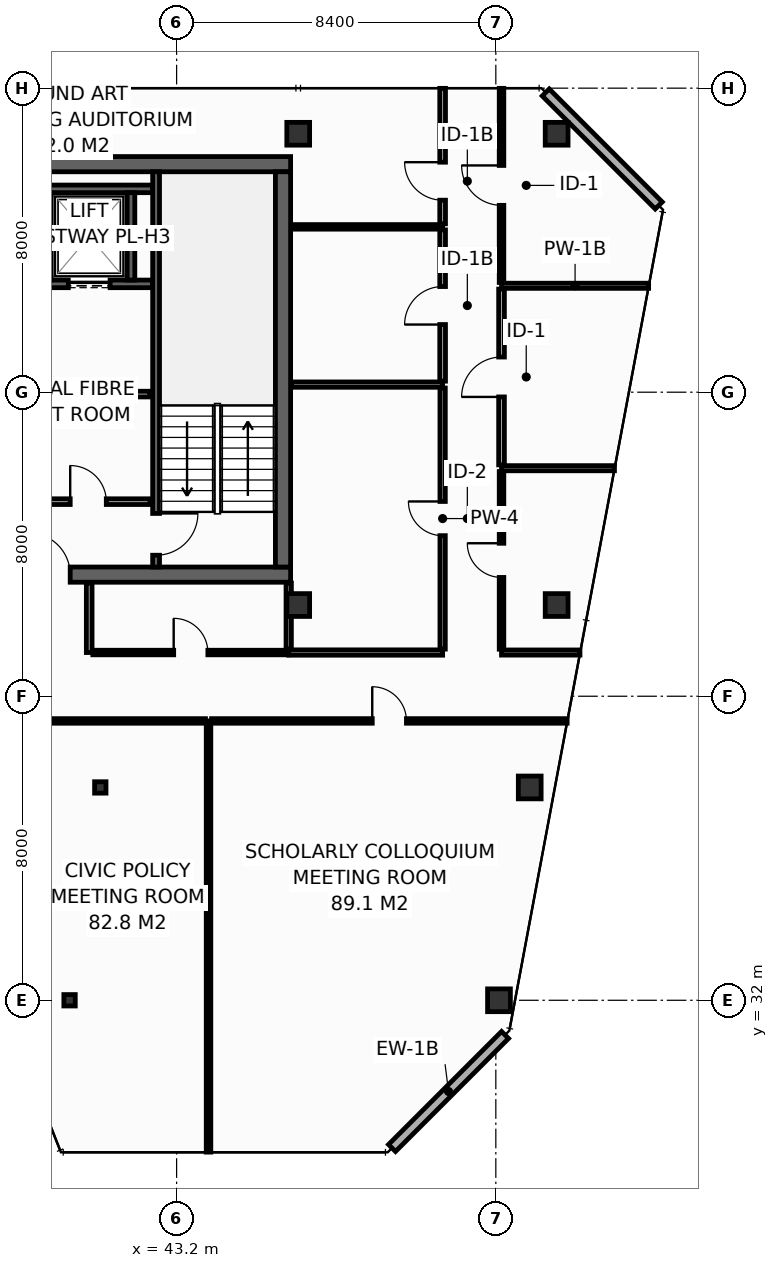
"""IFC4 building model, lengths in metres.
Left out: names, types, materials, properties, quantities, classifications, styles, units other than length and angle.
Written with IfcOpenShell. Run it as: python <this file> out.ifc"""

import sys

from ifc_helpers import new_model, si_unit, direction, frame, frame_2d, origin, origin_2d, place, context, subcontext, project, spatial, rectangle, hollow_rectangle, extrude, element, fill, save


model = new_model("IFC4")
c1 = context("Model", 3, precision=1e-05, world=origin(), true_north=direction((0.0, 1.0)))
c2 = subcontext(c1, "Body", "Model", "MODEL_VIEW")
j1 = project(units=[si_unit("LENGTHUNIT", "METRE"), si_unit("PLANEANGLEUNIT", "RADIAN")], contexts=[c1])
p1 = place(None, origin())
s1 = spatial("IfcSite", under=j1, at=p1, CompositionType="ELEMENT")
p2 = place(p1, origin())
s2 = spatial("IfcBuilding", under=s1, at=p2, CompositionType="ELEMENT")
p3 = place(p2, frame((0.0, 0.0, 287.6)))
s3 = spatial("IfcBuildingStorey", under=s2, at=p3, CompositionType="ELEMENT", Elevation=287.6)
p4 = place(p3, frame((13.7, 43.2, 0.0), z_axis=(0.0, 0.0, 1.0), x_axis=(1.0, 0.0, 0.0)))
e1 = element("IfcWall", 1, at=p4, inside=s3, PredefinedType="SHEAR", context=c2, shape_type="SweptSolid", body=[
    extrude(rectangle(XDim=32.5, YDim=0.4, at=frame_2d((16.25, 0.0))), origin(), (0.0, 0.0, 1.0), 3.55),
])
p5 = place(p4, frame((5.4, 0.0, 0.0)))
e2 = element("IfcOpeningElement", 2, at=p5, cuts=e1, PredefinedType="OPENING", context=c2, shape_type="SweptSolid", body=[
    extrude(rectangle(XDim=1.1, YDim=2.15, at=frame_2d((0.55, 1.075))), frame((0.0, 0.21, 0.0), z_axis=(0.0, -1.0, 0.0), x_axis=(1.0, 0.0, 0.0)), (0.0, 0.0, 1.0), 0.42),
])
p6 = place(p4, frame((25.6, 0.0, 0.0)))
e3 = element("IfcOpeningElement", 3, at=p6, cuts=e1, PredefinedType="OPENING", context=c2, shape_type="SweptSolid", body=[
    extrude(rectangle(XDim=1.1, YDim=2.15, at=frame_2d((0.55, 1.075))), frame((0.0, 0.21, 0.0), z_axis=(0.0, -1.0, 0.0), x_axis=(1.0, 0.0, 0.0)), (0.0, 0.0, 1.0), 0.42),
])
p7 = place(p3, frame((13.7, 54.0, 0.0), z_axis=(0.0, 0.0, 1.0), x_axis=(1.0, 0.0, 0.0)))
e4 = element("IfcWall", 4, at=p7, inside=s3, PredefinedType="SHEAR", context=c2, shape_type="SweptSolid", body=[
    extrude(rectangle(XDim=32.5, YDim=0.4, at=frame_2d((16.25, 0.0))), origin(), (0.0, 0.0, 1.0), 3.55),
])
p8 = place(p3, frame((46.0, 43.4, 0.0), z_axis=(0.0, 0.0, 1.0), x_axis=(0.0, 1.0, 0.0)))
e5 = element("IfcWall", 5, at=p8, inside=s3, PredefinedType="SHEAR", context=c2, shape_type="SweptSolid", body=[
    extrude(rectangle(XDim=10.4, YDim=0.4, at=frame_2d((5.2, 0.0))), origin(), (0.0, 0.0, 1.0), 3.55),
])
for number, where, z_axis, x_axis in (
    (6, (46.4, 54.8, 0.0), (0.0, 0.0, 1.0), (1.0, 0.0, 0.0)),
    (7, (53.2, 54.8, 0.0), (0.0, 0.0, 1.0), (1.0, 0.0, 0.0)),
    (8, (46.4, 42.4, 0.0), (0.0, 0.0, 1.0), (1.0, 0.0, 0.0)),
    (9, (53.2, 42.4, 0.0), (0.0, 0.0, 1.0), (1.0, 0.0, 0.0)),
    (10, (51.683, 32.0, 0.0), (0.0, 0.0, 1.0), (1.0, 0.0, 0.0)),
):
    element("IfcColumn", number, at=place(p3, frame(where, z_axis=z_axis, x_axis=x_axis)), inside=s3, PredefinedType="COLUMN", context=c2, shape_type="SweptSolid", body=[
        extrude(hollow_rectangle(XDim=0.6, YDim=0.6, WallThickness=0.028, at=origin_2d()), origin(), (0.0, 0.0, 1.0), 3.8),
    ])
p9 = place(p3, frame((40.383, 32.0, 0.0), z_axis=(0.0, 0.0, 1.0), x_axis=(1.0, 0.0, 0.0)))
e11 = element("IfcColumn", 11, at=p9, inside=s3, PredefinedType="COLUMN", context=c2, shape_type="SweptSolid", body=[
    extrude(hollow_rectangle(XDim=0.3, YDim=0.3, WallThickness=0.012, at=origin_2d()), origin(), (0.0, 0.0, 1.0), 3.8),
])
p10 = place(p3, frame((52.492, 37.6, 0.0), z_axis=(0.0, 0.0, 1.0), x_axis=(1.0, 0.0, 0.0)))
e12 = element("IfcColumn", 12, at=p10, inside=s3, PredefinedType="COLUMN", context=c2, shape_type="SweptSolid", body=[
    extrude(hollow_rectangle(XDim=0.6, YDim=0.6, WallThickness=0.028, at=origin_2d()), origin(), (0.0, 0.0, 1.0), 3.8),
])
p11 = place(p3, frame((41.192, 37.6, 0.0), z_axis=(0.0, 0.0, 1.0), x_axis=(1.0, 0.0, 0.0)))
e13 = element("IfcColumn", 13, at=p11, inside=s3, PredefinedType="COLUMN", context=c2, shape_type="SweptSolid", body=[
    extrude(hollow_rectangle(XDim=0.3, YDim=0.3, WallThickness=0.012, at=origin_2d()), origin(), (0.0, 0.0, 1.0), 3.8),
])
p12 = place(p3, frame((39.525, 50.85, 0.0), z_axis=(0.0, 0.0, 1.0), x_axis=(1.0, 0.0, 0.0)))
e14 = element("IfcWall", 14, at=p12, inside=s3, PredefinedType="SHEAR", context=c2, shape_type="SweptSolid", body=[
    extrude(rectangle(XDim=3.045, YDim=0.2, at=frame_2d((1.522, 0.0))), origin(), (0.0, 0.0, 1.0), 3.55),
])
p13 = place(p12, frame((0.825, 0.0, 0.0)))
e15 = element("IfcOpeningElement", 15, at=p13, cuts=e14, PredefinedType="OPENING", context=c2, shape_type="SweptSolid", body=[
    extrude(rectangle(XDim=1.1, YDim=2.2, at=frame_2d((0.55, 1.1))), frame((0.0, 0.11, 0.0), z_axis=(0.0, -1.0, 0.0), x_axis=(1.0, 0.0, 0.0)), (0.0, 0.0, 1.0), 0.22),
])
p14 = place(p3, frame((39.525, 53.35, 0.0), z_axis=(0.0, 0.0, 1.0), x_axis=(1.0, 0.0, 0.0)))
e16 = element("IfcWall", 16, at=p14, inside=s3, PredefinedType="SHEAR", context=c2, shape_type="SweptSolid", body=[
    extrude(rectangle(XDim=3.045, YDim=0.2, at=frame_2d((1.522, 0.0))), origin(), (0.0, 0.0, 1.0), 3.55),
])
p15 = place(p3, frame((42.0, 50.95, 0.0), z_axis=(0.0, 0.0, 1.0), x_axis=(0.0, 1.0, 0.0)))
e17 = element("IfcWall", 17, at=p15, inside=s3, PredefinedType="SHEAR", context=c2, shape_type="SweptSolid", body=[
    extrude(rectangle(XDim=2.3, YDim=0.2, at=frame_2d((1.15, 0.0))), origin(), (0.0, 0.0, 1.0), 3.55),
])
p16 = place(p3, frame((42.66, 53.8, 0.0), z_axis=(0.0, 0.0, 1.0), x_axis=(0.0, -1.0, 0.0)))
e18 = element("IfcWall", 18, at=p16, inside=s3, PredefinedType="SHEAR", context=c2, shape_type="SweptSolid", body=[
    extrude(rectangle(XDim=10.4, YDim=0.18, at=frame_2d((5.2, 0.0))), origin(), (0.0, 0.0, 1.0), 3.55),
])
p17 = place(p16, frame((8.99, 0.0, 0.0)))
e19 = element("IfcOpeningElement", 19, at=p17, cuts=e18, PredefinedType="OPENING", context=c2, shape_type="SweptSolid", body=[
    extrude(rectangle(XDim=1.1, YDim=2.15, at=frame_2d((0.55, 1.075))), frame((0.0, 0.1, 0.0), z_axis=(0.0, -1.0, 0.0), x_axis=(1.0, 0.0, 0.0)), (0.0, 0.0, 1.0), 0.2),
])
p18 = place(p3, frame((36.15, 45.12, 0.0), z_axis=(0.0, 0.0, 1.0), x_axis=(1.0, 0.0, 0.0)))
e20 = element("IfcWall", 20, at=p18, inside=s3, PredefinedType="PARTITIONING", context=c2, shape_type="SweptSolid", body=[
    extrude(rectangle(XDim=6.35, YDim=0.15, at=frame_2d((3.175, 0.0))), origin(), (0.0, 0.0, 1.0), 3.55),
])
p19 = place(p18, frame((1.05, 0.0, 0.0)))
e21 = element("IfcOpeningElement", 21, at=p19, cuts=e20, PredefinedType="OPENING", context=c2, shape_type="SweptSolid", body=[
    extrude(rectangle(XDim=0.95, YDim=2.15, at=frame_2d((0.475, 1.075))), frame((0.0, 0.085, 0.0), z_axis=(0.0, -1.0, 0.0), x_axis=(1.0, 0.0, 0.0)), (0.0, 0.0, 1.0), 0.17),
])
p20 = place(p18, frame((4.25, 0.0, 0.0)))
e22 = element("IfcOpeningElement", 22, at=p20, cuts=e20, PredefinedType="OPENING", context=c2, shape_type="SweptSolid", body=[
    extrude(rectangle(XDim=0.95, YDim=2.15, at=frame_2d((0.475, 1.075))), frame((0.0, 0.085, 0.0), z_axis=(0.0, -1.0, 0.0), x_axis=(1.0, 0.0, 0.0)), (0.0, 0.0, 1.0), 0.17),
])
p21 = place(p3, frame((36.15, 47.95, 0.0), z_axis=(0.0, 0.0, 1.0), x_axis=(1.0, 0.0, 0.0)))
e23 = element("IfcWall", 23, at=p21, inside=s3, PredefinedType="PARTITIONING", context=c2, shape_type="SweptSolid", body=[
    extrude(rectangle(XDim=6.35, YDim=0.15, at=frame_2d((3.175, 0.0))), origin(), (0.0, 0.0, 1.0), 3.55),
])
for number, where, z_axis, x_axis in (
    (24, (48.869, 28.113, 0.0), (0.0, 0.0, 1.0), (0.707, 0.707, 0.0)),
    (25, (55.887, 52.913, 0.0), (0.0, 0.0, 1.0), (-0.707, 0.707, 0.0)),
):
    element("IfcWall", number, at=place(p3, frame(where, z_axis=z_axis, x_axis=x_axis)), inside=s3, PredefinedType="STANDARD", context=c2, shape_type="SweptSolid", body=[
        extrude(rectangle(XDim=4.206, YDim=0.26, at=frame_2d((2.103, 0.0))), origin(), (0.0, 0.0, 1.0), 3.55),
    ])
p22 = place(p3, frame((46.15, 41.15, 0.0), z_axis=(0.0, 0.0, 1.0), x_axis=(1.0, 0.0, 0.0)))
e26 = element("IfcWall", 26, at=p22, inside=s3, PredefinedType="PARTITIONING", context=c2, shape_type="SweptSolid", body=[
    extrude(rectangle(XDim=4.05, YDim=0.14, at=frame_2d((2.025, 0.0))), origin(), (0.0, 0.0, 1.0), 3.55),
])
p23 = place(p3, frame((46.15, 41.24, 0.0), z_axis=(0.0, 0.0, 1.0), x_axis=(0.0, 1.0, 0.0)))
e27 = element("IfcWall", 27, at=p23, inside=s3, PredefinedType="PARTITIONING", context=c2, shape_type="SweptSolid", body=[
    extrude(rectangle(XDim=1.74, YDim=0.14, at=frame_2d((0.87, 0.0))), origin(), (0.0, 0.0, 1.0), 3.55),
])
p24 = place(p3, frame((46.22, 48.2, 0.0), z_axis=(0.0, 0.0, 1.0), x_axis=(1.0, 0.0, 0.0)))
e28 = element("IfcWall", 28, at=p24, inside=s3, PredefinedType="PARTITIONING", context=c2, shape_type="SweptSolid", body=[
    extrude(rectangle(XDim=3.98, YDim=0.14, at=frame_2d((1.99, 0.0))), origin(), (0.0, 0.0, 1.0), 3.55),
])
p25 = place(p3, frame((50.2, 41.24, 0.0), z_axis=(0.0, 0.0, 1.0), x_axis=(0.0, 1.0, 0.0)))
e29 = element("IfcWall", 29, at=p25, inside=s3, PredefinedType="PARTITIONING", context=c2, shape_type="SweptSolid", body=[
    extrude(rectangle(XDim=6.87, YDim=0.14, at=frame_2d((3.435, 0.0))), origin(), (0.0, 0.0, 1.0), 2.947),
])
p26 = place(p25, frame((2.985, 0.0, 0.0)))
e30 = element("IfcOpeningElement", 30, at=p26, cuts=e29, PredefinedType="OPENING", context=c2, shape_type="SweptSolid", body=[
    extrude(rectangle(XDim=0.9, YDim=2.1, at=frame_2d((0.45, 1.05))), frame((0.0, 0.08, 0.0), z_axis=(0.0, -1.0, 0.0), x_axis=(1.0, 0.0, 0.0)), (0.0, 0.0, 1.0), 0.16),
])
p27 = place(p3, frame((46.22, 52.35, 0.0), z_axis=(0.0, 0.0, 1.0), x_axis=(1.0, 0.0, 0.0)))
e31 = element("IfcWall", 31, at=p27, inside=s3, PredefinedType="PARTITIONING", context=c2, shape_type="SweptSolid", body=[
    extrude(rectangle(XDim=3.98, YDim=0.12, at=frame_2d((1.99, 0.0))), origin(), (0.0, 0.0, 1.0), 3.55),
])
p28 = place(p3, frame((50.2, 48.29, 0.0), z_axis=(0.0, 0.0, 1.0), x_axis=(0.0, 1.0, 0.0)))
e32 = element("IfcWall", 32, at=p28, inside=s3, PredefinedType="PARTITIONING", context=c2, shape_type="SweptSolid", body=[
    extrude(rectangle(XDim=3.98, YDim=0.15, at=frame_2d((1.99, 0.0))), origin(), (0.0, 0.0, 1.0), 3.55),
])
p29 = place(p28, frame((1.49, 0.0, 0.0)))
e33 = element("IfcOpeningElement", 33, at=p29, cuts=e32, PredefinedType="OPENING", context=c2, shape_type="SweptSolid", body=[
    extrude(rectangle(XDim=1.0, YDim=2.15, at=frame_2d((0.5, 1.075))), frame((0.0, 0.085, 0.0), z_axis=(0.0, -1.0, 0.0), x_axis=(1.0, 0.0, 0.0)), (0.0, 0.0, 1.0), 0.17),
])
p30 = place(p3, frame((50.2, 52.43, 0.0), z_axis=(0.0, 0.0, 1.0), x_axis=(0.0, 1.0, 0.0)))
e34 = element("IfcWall", 34, at=p30, inside=s3, PredefinedType="PARTITIONING", context=c2, shape_type="SweptSolid", body=[
    extrude(rectangle(XDim=3.565, YDim=0.15, at=frame_2d((1.783, 0.0))), origin(), (0.0, 0.0, 1.0), 2.935),
])
p31 = place(p30, frame((0.622, 0.0, 0.0)))
e35 = element("IfcOpeningElement", 35, at=p31, cuts=e34, PredefinedType="OPENING", context=c2, shape_type="SweptSolid", body=[
    extrude(rectangle(XDim=1.0, YDim=2.15, at=frame_2d((0.5, 1.075))), frame((0.0, 0.085, 0.0), z_axis=(0.0, -1.0, 0.0), x_axis=(1.0, 0.0, 0.0)), (0.0, 0.0, 1.0), 0.17),
])
p32 = place(p3, frame((51.75, 41.15, 0.0), z_axis=(0.0, 0.0, 1.0), x_axis=(1.0, 0.0, 0.0)))
e36 = element("IfcWall", 36, at=p32, inside=s3, PredefinedType="PARTITIONING", context=c2, shape_type="SweptSolid", body=[
    extrude(rectangle(XDim=2.064, YDim=0.135, at=frame_2d((1.032, 0.0))), origin(), (0.0, 0.0, 1.0), 3.085),
])
p33 = place(p3, frame((51.75, 46.0, 0.0), z_axis=(0.0, 0.0, 1.0), x_axis=(1.0, 0.0, 0.0)))
e37 = element("IfcWall", 37, at=p33, inside=s3, PredefinedType="PARTITIONING", context=c2, shape_type="SweptSolid", body=[
    extrude(rectangle(XDim=2.972, YDim=0.135, at=frame_2d((1.486, 0.0))), origin(), (0.0, 0.0, 1.0), 2.947),
])
p34 = place(p3, frame((51.75, 50.8, 0.0), z_axis=(0.0, 0.0, 1.0), x_axis=(1.0, 0.0, 0.0)))
e38 = element("IfcWall", 38, at=p34, inside=s3, PredefinedType="PARTITIONING", context=c2, shape_type="SweptSolid", body=[
    extrude(rectangle(XDim=3.87, YDim=0.135, at=frame_2d((1.935, 0.0))), origin(), (0.0, 0.0, 1.0), 2.947),
])
p35 = place(p3, frame((51.75, 41.238, 0.0), z_axis=(0.0, 0.0, 1.0), x_axis=(0.0, 1.0, 0.0)))
e39 = element("IfcWall", 39, at=p35, inside=s3, PredefinedType="PARTITIONING", context=c2, shape_type="SweptSolid", body=[
    extrude(rectangle(XDim=4.675, YDim=0.12, at=frame_2d((2.337, 0.0))), origin(), (0.0, 0.0, 1.0), 2.947),
])
p36 = place(p35, frame((1.888, 0.0, 0.0)))
e40 = element("IfcOpeningElement", 40, at=p36, cuts=e39, PredefinedType="OPENING", context=c2, shape_type="SweptSolid", body=[
    extrude(rectangle(XDim=0.9, YDim=2.1, at=frame_2d((0.45, 1.05))), frame((0.0, 0.07, 0.0), z_axis=(0.0, -1.0, 0.0), x_axis=(1.0, 0.0, 0.0)), (0.0, 0.0, 1.0), 0.14),
])
p37 = place(p3, frame((51.75, 46.087, 0.0), z_axis=(0.0, 0.0, 1.0), x_axis=(0.0, 1.0, 0.0)))
e41 = element("IfcWall", 41, at=p37, inside=s3, PredefinedType="PARTITIONING", context=c2, shape_type="SweptSolid", body=[
    extrude(rectangle(XDim=4.625, YDim=0.15, at=frame_2d((2.312, 0.0))), origin(), (0.0, 0.0, 1.0), 3.55),
])
p38 = place(p37, frame((1.788, 0.0, 0.0)))
e42 = element("IfcOpeningElement", 42, at=p38, cuts=e41, PredefinedType="OPENING", context=c2, shape_type="SweptSolid", body=[
    extrude(rectangle(XDim=1.05, YDim=2.15, at=frame_2d((0.525, 1.075))), frame((0.0, 0.085, 0.0), z_axis=(0.0, -1.0, 0.0), x_axis=(1.0, 0.0, 0.0)), (0.0, 0.0, 1.0), 0.17),
])
p39 = place(p3, frame((51.75, 50.887, 0.0), z_axis=(0.0, 0.0, 1.0), x_axis=(0.0, 1.0, 0.0)))
e43 = element("IfcWall", 43, at=p39, inside=s3, PredefinedType="PARTITIONING", context=c2, shape_type="SweptSolid", body=[
    extrude(rectangle(XDim=5.108, YDim=0.12, at=frame_2d((2.554, 0.0))), origin(), (0.0, 0.0, 1.0), 2.935),
])
p40 = place(p39, frame((2.029, 0.0, 0.0)))
e44 = element("IfcOpeningElement", 44, at=p40, cuts=e43, PredefinedType="OPENING", context=c2, shape_type="SweptSolid", body=[
    extrude(rectangle(XDim=1.05, YDim=2.15, at=frame_2d((0.525, 1.075))), frame((0.0, 0.07, 0.0), z_axis=(0.0, -1.0, 0.0), x_axis=(1.0, 0.0, 0.0)), (0.0, 0.0, 1.0), 0.14),
])
p41 = place(p3, frame((40.9, 41.15, 0.0), z_axis=(0.0, 0.0, 1.0), x_axis=(0.0, 1.0, 0.0)))
e45 = element("IfcWall", 45, at=p41, inside=s3, PredefinedType="PARTITIONING", context=c2, shape_type="SweptSolid", body=[
    extrude(rectangle(XDim=1.83, YDim=0.15, at=frame_2d((0.915, 0.0))), origin(), (0.0, 0.0, 1.0), 3.55),
])
p42 = place(p3, frame((40.995, 41.15, 0.0), z_axis=(0.0, 0.0, 1.0), x_axis=(1.0, 0.0, 0.0)))
e46 = element("IfcWall", 46, at=p42, inside=s3, PredefinedType="PARTITIONING", context=c2, shape_type="SweptSolid", body=[
    extrude(rectangle(XDim=5.155, YDim=0.12, at=frame_2d((2.577, 0.0))), origin(), (0.0, 0.0, 1.0), 3.55),
])
p43 = place(p42, frame((2.128, 0.0, 0.0)))
e47 = element("IfcOpeningElement", 47, at=p43, cuts=e46, PredefinedType="OPENING", context=c2, shape_type="SweptSolid", body=[
    extrude(rectangle(XDim=0.9, YDim=2.1, at=frame_2d((0.45, 1.05))), frame((0.0, 0.07, 0.0), z_axis=(0.0, -1.0, 0.0), x_axis=(1.0, 0.0, 0.0)), (0.0, 0.0, 1.0), 0.14),
])
p44 = place(p3, frame((44.04, 28.005, 0.0), z_axis=(0.0, 0.0, 1.0), x_axis=(0.0, 1.0, 0.0)))
e48 = element("IfcWall", 48, at=p44, inside=s3, PredefinedType="PARTITIONING", context=c2, shape_type="SweptSolid", body=[
    extrude(rectangle(XDim=11.345, YDim=0.12, at=frame_2d((5.673, 0.0))), origin(), (0.0, 0.0, 1.0), 3.047),
])
p45 = place(p3, frame((32.427, 39.35, 0.0), z_axis=(0.0, 0.0, 1.0), x_axis=(1.0, 0.0, 0.0)))
e49 = element("IfcWall", 49, at=p45, inside=s3, PredefinedType="PARTITIONING", context=c2, shape_type="SweptSolid", body=[
    extrude(rectangle(XDim=11.532, YDim=0.12, at=frame_2d((5.766, 0.0))), origin(), (0.0, 0.0, 1.0), 3.047),
])
p46 = place(p45, frame((5.316, 0.0, 0.0)))
e50 = element("IfcOpeningElement", 50, at=p46, cuts=e49, PredefinedType="OPENING", context=c2, shape_type="SweptSolid", body=[
    extrude(rectangle(XDim=0.9, YDim=2.1, at=frame_2d((0.45, 1.05))), frame((0.0, 0.07, 0.0), z_axis=(0.0, -1.0, 0.0), x_axis=(1.0, 0.0, 0.0)), (0.0, 0.0, 1.0), 0.14),
])
p47 = place(p3, frame((44.12, 39.35, 0.0), z_axis=(0.0, 0.0, 1.0), x_axis=(1.0, 0.0, 0.0)))
e51 = element("IfcWall", 51, at=p47, inside=s3, PredefinedType="PARTITIONING", context=c2, shape_type="SweptSolid", body=[
    extrude(rectangle(XDim=9.356, YDim=0.12, at=frame_2d((4.678, 0.0))), origin(), (0.0, 0.0, 1.0), 3.085),
])
p48 = place(p47, frame((4.228, 0.0, 0.0)))
e52 = element("IfcOpeningElement", 52, at=p48, cuts=e51, PredefinedType="OPENING", context=c2, shape_type="SweptSolid", body=[
    extrude(rectangle(XDim=0.9, YDim=2.1, at=frame_2d((0.45, 1.05))), frame((0.0, 0.07, 0.0), z_axis=(0.0, -1.0, 0.0), x_axis=(1.0, 0.0, 0.0)), (0.0, 0.0, 1.0), 0.14),
])
p49 = place(p13, origin())
e53 = element("IfcDoor", 53, at=p49, inside=s3, OperationType="SLIDING_TO_LEFT", PredefinedType="DOOR", context=c2, shape_type="SweptSolid", body=[
    extrude(rectangle(XDim=1.1, YDim=2.2, at=frame_2d((0.55, 1.1))), frame((0.0, 0.025, 0.0), z_axis=(0.0, -1.0, 0.0), x_axis=(1.0, 0.0, 0.0)), (0.0, 0.0, 1.0), 0.05),
])
fill(e15, e53)
p50 = place(p17, origin())
e54 = element("IfcDoor", 54, at=p50, inside=s3, OperationType="SINGLE_SWING_LEFT", PredefinedType="DOOR", context=c2, shape_type="SweptSolid", body=[
    extrude(rectangle(XDim=1.1, YDim=2.15, at=frame_2d((0.55, 1.075))), frame((0.0, 0.025, 0.0), z_axis=(0.0, -1.0, 0.0), x_axis=(1.0, 0.0, 0.0)), (0.0, 0.0, 1.0), 0.05),
])
fill(e19, e54)
p51 = place(p6, origin())
e55 = element("IfcDoor", 55, at=p51, inside=s3, OperationType="SINGLE_SWING_LEFT", PredefinedType="DOOR", context=c2, shape_type="SweptSolid", body=[
    extrude(rectangle(XDim=1.1, YDim=2.15, at=frame_2d((0.55, 1.075))), frame((0.0, 0.025, 0.0), z_axis=(0.0, -1.0, 0.0), x_axis=(1.0, 0.0, 0.0)), (0.0, 0.0, 1.0), 0.05),
])
fill(e3, e55)
p52 = place(p20, origin())
e56 = element("IfcDoor", 56, at=p52, inside=s3, OperationType="SINGLE_SWING_LEFT", PredefinedType="DOOR", context=c2, shape_type="SweptSolid", body=[
    extrude(rectangle(XDim=0.95, YDim=2.15, at=frame_2d((0.475, 1.075))), frame((0.0, 0.025, 0.0), z_axis=(0.0, -1.0, 0.0), x_axis=(1.0, 0.0, 0.0)), (0.0, 0.0, 1.0), 0.05),
])
fill(e22, e56)
p53 = place(p26, origin())
e57 = element("IfcDoor", 57, at=p53, inside=s3, OperationType="SINGLE_SWING_RIGHT", PredefinedType="DOOR", context=c2, shape_type="SweptSolid", body=[
    extrude(rectangle(XDim=0.9, YDim=2.1, at=frame_2d((0.45, 1.05))), frame((0.0, 0.025, 0.0), z_axis=(0.0, -1.0, 0.0), x_axis=(1.0, 0.0, 0.0)), (0.0, 0.0, 1.0), 0.05),
])
fill(e30, e57)
p54 = place(p29, origin())
e58 = element("IfcDoor", 58, at=p54, inside=s3, OperationType="SINGLE_SWING_LEFT", PredefinedType="DOOR", context=c2, shape_type="SweptSolid", body=[
    extrude(rectangle(XDim=1.0, YDim=2.15, at=frame_2d((0.5, 1.075))), frame((0.0, 0.025, 0.0), z_axis=(0.0, -1.0, 0.0), x_axis=(1.0, 0.0, 0.0)), (0.0, 0.0, 1.0), 0.05),
])
fill(e33, e58)
p55 = place(p31, origin())
e59 = element("IfcDoor", 59, at=p55, inside=s3, OperationType="SINGLE_SWING_RIGHT", PredefinedType="DOOR", context=c2, shape_type="SweptSolid", body=[
    extrude(rectangle(XDim=1.0, YDim=2.15, at=frame_2d((0.5, 1.075))), frame((0.0, 0.025, 0.0), z_axis=(0.0, -1.0, 0.0), x_axis=(1.0, 0.0, 0.0)), (0.0, 0.0, 1.0), 0.05),
])
fill(e35, e59)
p56 = place(p36, origin())
e60 = element("IfcDoor", 60, at=p56, inside=s3, OperationType="SINGLE_SWING_RIGHT", PredefinedType="DOOR", context=c2, shape_type="SweptSolid", body=[
    extrude(rectangle(XDim=0.9, YDim=2.1, at=frame_2d((0.45, 1.05))), frame((0.0, 0.025, 0.0), z_axis=(0.0, -1.0, 0.0), x_axis=(1.0, 0.0, 0.0)), (0.0, 0.0, 1.0), 0.05),
])
fill(e40, e60)
p57 = place(p38, origin())
e61 = element("IfcDoor", 61, at=p57, inside=s3, OperationType="SINGLE_SWING_LEFT", PredefinedType="DOOR", context=c2, shape_type="SweptSolid", body=[
    extrude(rectangle(XDim=1.05, YDim=2.15, at=frame_2d((0.525, 1.075))), frame((0.0, 0.025, 0.0), z_axis=(0.0, -1.0, 0.0), x_axis=(1.0, 0.0, 0.0)), (0.0, 0.0, 1.0), 0.05),
])
fill(e42, e61)
p58 = place(p40, origin())
e62 = element("IfcDoor", 62, at=p58, inside=s3, OperationType="SINGLE_SWING_RIGHT", PredefinedType="DOOR", context=c2, shape_type="SweptSolid", body=[
    extrude(rectangle(XDim=1.05, YDim=2.15, at=frame_2d((0.525, 1.075))), frame((0.0, 0.025, 0.0), z_axis=(0.0, -1.0, 0.0), x_axis=(1.0, 0.0, 0.0)), (0.0, 0.0, 1.0), 0.05),
])
fill(e44, e62)
p59 = place(p43, origin())
e63 = element("IfcDoor", 63, at=p59, inside=s3, OperationType="SINGLE_SWING_LEFT", PredefinedType="DOOR", context=c2, shape_type="SweptSolid", body=[
    extrude(rectangle(XDim=0.9, YDim=2.1, at=frame_2d((0.45, 1.05))), frame((0.0, 0.025, 0.0), z_axis=(0.0, -1.0, 0.0), x_axis=(1.0, 0.0, 0.0)), (0.0, 0.0, 1.0), 0.05),
])
fill(e47, e63)
p60 = place(p48, origin())
e64 = element("IfcDoor", 64, at=p60, inside=s3, OperationType="SINGLE_SWING_LEFT", PredefinedType="DOOR", context=c2, shape_type="SweptSolid", body=[
    extrude(rectangle(XDim=0.9, YDim=2.1, at=frame_2d((0.45, 1.05))), frame((0.0, 0.025, 0.0), z_axis=(0.0, -1.0, 0.0), x_axis=(1.0, 0.0, 0.0)), (0.0, 0.0, 1.0), 0.05),
])
fill(e52, e64)
save(model, sys.argv[1])
